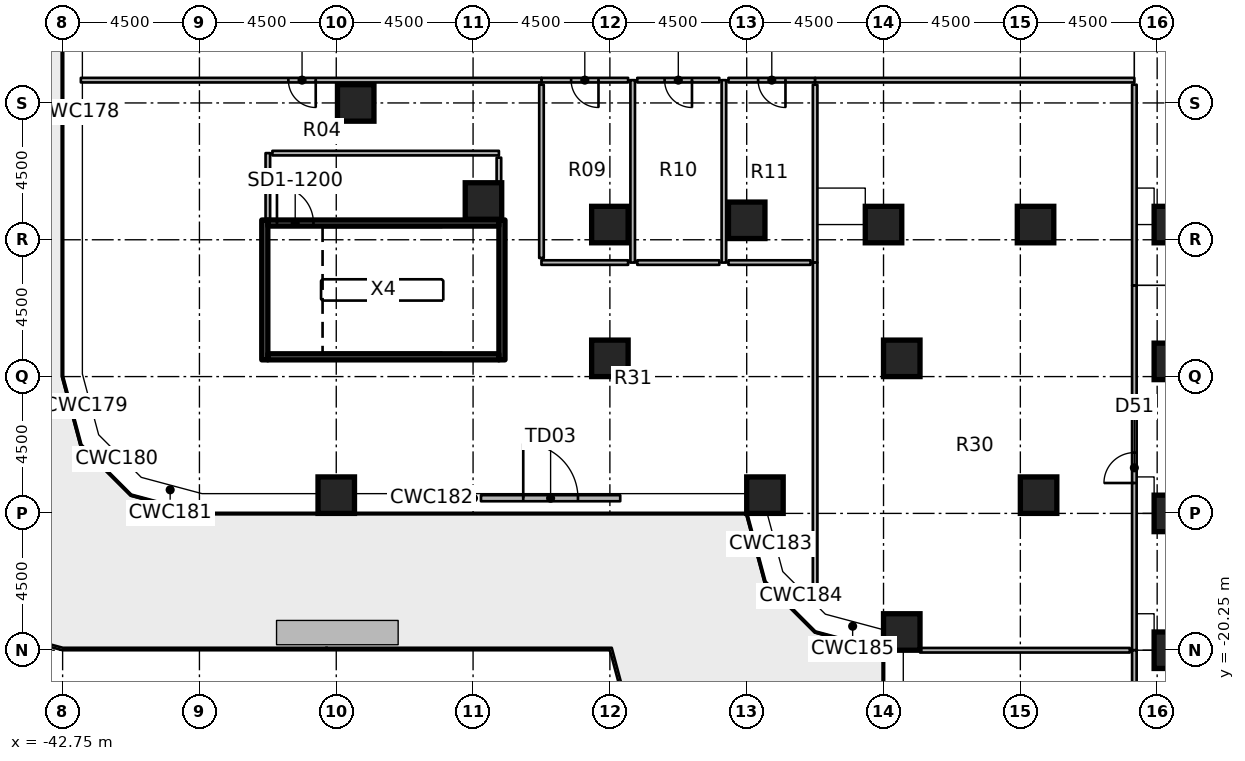
"""IFC4 building model, lengths in metres.
Left out: names, types, materials, properties, quantities, classifications, styles, units other than length and angle.
Written with IfcOpenShell. Run it as: python <this file> out.ifc"""

import sys

from ifc_helpers import new_model, si_unit, direction, frame, frame_2d, origin, origin_2d, place, context, subcontext, project, spatial, rectangle, extrude, element, fill, save


model = new_model("IFC4")
c1 = context("Model", 3, precision=1e-05, world=origin(), true_north=direction((0.0, 1.0)))
c2 = subcontext(c1, "Body", "Model", "MODEL_VIEW")
j1 = project(units=[si_unit("LENGTHUNIT", "METRE"), si_unit("PLANEANGLEUNIT", "RADIAN")], contexts=[c1])
p1 = place(None, origin())
s1 = spatial("IfcSite", under=j1, at=p1, CompositionType="ELEMENT")
p2 = place(p1, origin())
s2 = spatial("IfcBuilding", under=s1, at=p2, CompositionType="ELEMENT")
p3 = place(p2, frame((0.0, 0.0, 17.0)))
s3 = spatial("IfcBuildingStorey", under=s2, at=p3, CompositionType="ELEMENT", Elevation=17.0)
for number, where, z_axis, x_axis in (
    (1, (-33.75, -15.15, 0.0), (0.0, 0.0, 1.0), (1.0, 0.0, 0.0)),
    (2, (-33.11, -2.25, 0.0), (0.0, 0.0, 1.0), (1.0, 0.0, 0.0)),
    (3, (-28.908, -5.475, 0.0), (0.0, 0.0, 1.0), (1.0, 0.0, 0.0)),
    (4, (-24.75, -10.65, 0.0), (0.0, 0.0, 1.0), (1.0, 0.0, 0.0)),
    (5, (-24.75, -6.25, 0.0), (0.0, 0.0, 1.0), (1.0, 0.0, 0.0)),
    (6, (-19.65, -15.15, 0.0), (0.0, 0.0, 1.0), (1.0, 0.0, 0.0)),
    (7, (-20.25, -6.11, 0.0), (0.0, 0.0, 1.0), (1.0, 0.0, 0.0)),
    (8, (-15.15, -19.65, 0.0), (0.0, 0.0, 1.0), (1.0, 0.0, 0.0)),
    (9, (-15.15, -10.65, 0.0), (0.0, 0.0, 1.0), (1.0, 0.0, 0.0)),
    (10, (-15.75, -6.25, 0.0), (0.0, 0.0, 1.0), (1.0, 0.0, 0.0)),
    (11, (-10.65, -15.15, 0.0), (0.0, 0.0, 1.0), (1.0, 0.0, 0.0)),
    (12, (-10.75, -6.25, 0.0), (0.0, 0.0, 1.0), (1.0, 0.0, 0.0)),
    (13, (-6.25, -20.25, 0.0), (0.0, 0.0, 1.0), (1.0, 0.0, 0.0)),
    (14, (-6.25, -15.75, 0.0), (0.0, 0.0, 1.0), (1.0, 0.0, 0.0)),
    (15, (-6.25, -10.75, 0.0), (0.0, 0.0, 1.0), (1.0, 0.0, 0.0)),
    (16, (-6.25, -6.25, 0.0), (0.0, 0.0, 1.0), (1.0, 0.0, 0.0)),
):
    element("IfcColumn", number, at=place(p3, frame(where, z_axis=z_axis, x_axis=x_axis)), inside=s3, PredefinedType="COLUMN", context=c2, shape_type="SweptSolid", body=[
        extrude(rectangle(XDim=1.2, YDim=1.2, at=origin_2d()), origin(), (0.0, 0.0, 1.0), 4.55),
    ])
p4 = place(p3, frame((-28.99, -15.25, 0.0), z_axis=(0.0, 0.0, 1.0), x_axis=(1.0, 0.0, 0.0)))
e17 = element("IfcWall", 17, at=p4, inside=s3, PredefinedType="SOLIDWALL", context=c2, shape_type="SweptSolid", body=[
    extrude(rectangle(XDim=4.58, YDim=0.2, at=frame_2d((2.29, 0.0))), origin(), (0.0, 0.0, 1.0), 4.55),
])
p5 = place(p4, frame((1.39, 0.0, 0.0)))
e18 = element("IfcOpeningElement", 18, at=p5, cuts=e17, PredefinedType="OPENING", context=c2, shape_type="SweptSolid", body=[
    extrude(rectangle(XDim=1.8, YDim=2.4, at=frame_2d((0.9, 1.2))), frame((0.0, 0.11, 0.0), z_axis=(0.0, -1.0, 0.0), x_axis=(1.0, 0.0, 0.0)), (0.0, 0.0, 1.0), 0.22),
])
for number, where, z_axis, x_axis in (
    (19, (-36.1, -10.7, 0.0), (0.0, 0.0, 1.0), (0.0, 1.0, 0.0)),
    (20, (-28.3, -10.7, 0.0), (0.0, 0.0, 1.0), (0.0, 1.0, 0.0)),
):
    element("IfcWall", number, at=place(p3, frame(where, z_axis=z_axis, x_axis=x_axis)), inside=s3, PredefinedType="SHEAR", context=c2, shape_type="SweptSolid", body=[
        extrude(rectangle(XDim=4.6, YDim=0.2, at=frame_2d((2.3, 0.0))), origin(), (0.0, 0.0, 1.0), 4.55),
    ])
p6 = place(p3, frame((-36.0, -10.6, 0.0), z_axis=(0.0, 0.0, 1.0), x_axis=(1.0, 0.0, 0.0)))
e21 = element("IfcWall", 21, at=p6, inside=s3, PredefinedType="SHEAR", context=c2, shape_type="SweptSolid", body=[
    extrude(rectangle(XDim=7.6, YDim=0.2, at=frame_2d((3.8, 0.0))), origin(), (0.0, 0.0, 1.0), 4.55),
])
p7 = place(p3, frame((-36.0, -6.2, 0.0), z_axis=(0.0, 0.0, 1.0), x_axis=(1.0, 0.0, 0.0)))
e22 = element("IfcWall", 22, at=p7, inside=s3, PredefinedType="SHEAR", context=c2, shape_type="SweptSolid", body=[
    extrude(rectangle(XDim=7.6, YDim=0.2, at=frame_2d((3.8, 0.0))), origin(), (0.0, 0.0, 1.0), 4.55),
])
p8 = place(p7, frame((0.3, 0.0, 0.0)))
e23 = element("IfcOpeningElement", 23, at=p8, cuts=e22, PredefinedType="OPENING", context=c2, shape_type="SweptSolid", body=[
    extrude(rectangle(XDim=1.2, YDim=2.1, at=frame_2d((0.6, 1.05))), frame((0.0, 0.11, 0.0), z_axis=(0.0, -1.0, 0.0), x_axis=(1.0, 0.0, 0.0)), (0.0, 0.0, 1.0), 0.22),
])
p9 = place(p3, frame((-36.0, -6.1, 0.0), z_axis=(0.0, 0.0, 1.0), x_axis=(0.0, 1.0, 0.0)))
e24 = element("IfcWall", 24, at=p9, inside=s3, PredefinedType="PARTITIONING", context=c2, shape_type="SweptSolid", body=[
    extrude(rectangle(XDim=2.2, YDim=0.15, at=frame_2d((1.1, 0.0))), origin(), (0.0, 0.0, 1.0), 4.55),
])
p10 = place(p3, frame((-35.85, -3.9, 0.0), z_axis=(0.0, 0.0, 1.0), x_axis=(1.0, 0.0, 0.0)))
e25 = element("IfcWall", 25, at=p10, inside=s3, PredefinedType="PARTITIONING", context=c2, shape_type="SweptSolid", body=[
    extrude(rectangle(XDim=7.45, YDim=0.15, at=frame_2d((3.725, 0.0))), origin(), (0.0, 0.0, 1.0), 4.55),
])
p11 = place(p3, frame((-28.4, -4.05, 0.0), z_axis=(0.0, 0.0, 1.0), x_axis=(0.0, -1.0, 0.0)))
e26 = element("IfcWall", 26, at=p11, inside=s3, PredefinedType="PARTITIONING", context=c2, shape_type="SweptSolid", body=[
    extrude(rectangle(XDim=0.825, YDim=0.15, at=frame_2d((0.413, 0.0))), origin(), (0.0, 0.0, 1.0), 4.55),
])
p12 = place(p3, frame((-24.0, -1.5, 0.0), z_axis=(0.0, 0.0, 1.0), x_axis=(0.0, -1.0, 0.0)))
e27 = element("IfcWall", 27, at=p12, inside=s3, PredefinedType="PARTITIONING", context=c2, shape_type="SweptSolid", body=[
    extrude(rectangle(XDim=6.0, YDim=0.15, at=frame_2d((3.0, 0.0))), origin(), (0.0, 0.0, 1.0), 4.55),
])
p13 = place(p3, frame((-24.15, -1.5, 0.0), z_axis=(0.0, 0.0, 1.0), x_axis=(-1.0, 0.0, 0.0)))
e28 = element("IfcWall", 28, at=p13, inside=s3, PredefinedType="PARTITIONING", context=c2, shape_type="SweptSolid", body=[
    extrude(rectangle(XDim=2.85, YDim=0.15, at=frame_2d((1.425, 0.0))), origin(), (0.0, 0.0, 1.0), 4.55),
])
p14 = place(p13, frame((0.975, 0.0, 0.0)))
e29 = element("IfcOpeningElement", 29, at=p14, cuts=e28, PredefinedType="OPENING", context=c2, shape_type="SweptSolid", body=[
    extrude(rectangle(XDim=0.9, YDim=2.1, at=frame_2d((0.45, 1.05))), frame((0.0, 0.085, 0.0), z_axis=(0.0, -1.0, 0.0), x_axis=(1.0, 0.0, 0.0)), (0.0, 0.0, 1.0), 0.17),
])
p15 = place(p3, frame((-24.15, -7.5, 0.0), z_axis=(0.0, 0.0, 1.0), x_axis=(-1.0, 0.0, 0.0)))
e30 = element("IfcWall", 30, at=p15, inside=s3, PredefinedType="PARTITIONING", context=c2, shape_type="SweptSolid", body=[
    extrude(rectangle(XDim=2.85, YDim=0.15, at=frame_2d((1.425, 0.0))), origin(), (0.0, 0.0, 1.0), 4.55),
])
p16 = place(p3, frame((-27.0, -7.35, 0.0), z_axis=(0.0, 0.0, 1.0), x_axis=(0.0, 1.0, 0.0)))
e31 = element("IfcWall", 31, at=p16, inside=s3, PredefinedType="PARTITIONING", context=c2, shape_type="SweptSolid", body=[
    extrude(rectangle(XDim=5.7, YDim=0.15, at=frame_2d((2.85, 0.0))), origin(), (0.0, 0.0, 1.0), 4.55),
])
p17 = place(p3, frame((-21.0, -1.5, 0.0), z_axis=(0.0, 0.0, 1.0), x_axis=(0.0, -1.0, 0.0)))
e32 = element("IfcWall", 32, at=p17, inside=s3, PredefinedType="PARTITIONING", context=c2, shape_type="SweptSolid", body=[
    extrude(rectangle(XDim=6.0, YDim=0.15, at=frame_2d((3.0, 0.0))), origin(), (0.0, 0.0, 1.0), 4.55),
])
p18 = place(p3, frame((-21.15, -1.5, 0.0), z_axis=(0.0, 0.0, 1.0), x_axis=(-1.0, 0.0, 0.0)))
e33 = element("IfcWall", 33, at=p18, inside=s3, PredefinedType="PARTITIONING", context=c2, shape_type="SweptSolid", body=[
    extrude(rectangle(XDim=2.7, YDim=0.15, at=frame_2d((1.35, 0.0))), origin(), (0.0, 0.0, 1.0), 4.55),
])
p19 = place(p18, frame((0.9, 0.0, 0.0)))
e34 = element("IfcOpeningElement", 34, at=p19, cuts=e33, PredefinedType="OPENING", context=c2, shape_type="SweptSolid", body=[
    extrude(rectangle(XDim=0.9, YDim=2.1, at=frame_2d((0.45, 1.05))), frame((0.0, 0.085, 0.0), z_axis=(0.0, -1.0, 0.0), x_axis=(1.0, 0.0, 0.0)), (0.0, 0.0, 1.0), 0.17),
])
p20 = place(p3, frame((-21.15, -7.5, 0.0), z_axis=(0.0, 0.0, 1.0), x_axis=(-1.0, 0.0, 0.0)))
e35 = element("IfcWall", 35, at=p20, inside=s3, PredefinedType="PARTITIONING", context=c2, shape_type="SweptSolid", body=[
    extrude(rectangle(XDim=2.7, YDim=0.15, at=frame_2d((1.35, 0.0))), origin(), (0.0, 0.0, 1.0), 4.55),
])
p21 = place(p3, frame((-18.0, -1.5, 0.0), z_axis=(0.0, 0.0, 1.0), x_axis=(-1.0, 0.0, 0.0)))
e36 = element("IfcWall", 36, at=p21, inside=s3, PredefinedType="PARTITIONING", context=c2, shape_type="SweptSolid", body=[
    extrude(rectangle(XDim=2.85, YDim=0.15, at=frame_2d((1.425, 0.0))), origin(), (0.0, 0.0, 1.0), 4.55),
])
p22 = place(p21, frame((0.975, 0.0, 0.0)))
e37 = element("IfcOpeningElement", 37, at=p22, cuts=e36, PredefinedType="OPENING", context=c2, shape_type="SweptSolid", body=[
    extrude(rectangle(XDim=0.9, YDim=2.1, at=frame_2d((0.45, 1.05))), frame((0.0, 0.085, 0.0), z_axis=(0.0, -1.0, 0.0), x_axis=(1.0, 0.0, 0.0)), (0.0, 0.0, 1.0), 0.17),
])
p23 = place(p3, frame((-18.0, -1.65, 0.0), z_axis=(0.0, 0.0, 1.0), x_axis=(0.0, -1.0, 0.0)))
e38 = element("IfcWall", 38, at=p23, inside=s3, PredefinedType="PARTITIONING", context=c2, shape_type="SweptSolid", body=[
    extrude(rectangle(XDim=5.85, YDim=0.15, at=frame_2d((2.925, 0.0))), origin(), (0.0, 0.0, 1.0), 4.55),
])
p24 = place(p3, frame((-18.15, -7.5, 0.0), z_axis=(0.0, 0.0, 1.0), x_axis=(-1.0, 0.0, 0.0)))
e39 = element("IfcWall", 39, at=p24, inside=s3, PredefinedType="PARTITIONING", context=c2, shape_type="SweptSolid", body=[
    extrude(rectangle(XDim=2.7, YDim=0.15, at=frame_2d((1.35, 0.0))), origin(), (0.0, 0.0, 1.0), 4.55),
])
p25 = place(p3, frame((-7.5, -20.25, 0.0), z_axis=(0.0, 0.0, 1.0), x_axis=(0.0, 1.0, 0.0)))
e40 = element("IfcWall", 40, at=p25, inside=s3, PredefinedType="PARTITIONING", context=c2, shape_type="SweptSolid", body=[
    extrude(rectangle(XDim=12.0, YDim=0.15, at=frame_2d((6.0, 0.0))), origin(), (0.0, 0.0, 1.0), 4.55),
])
p26 = place(p25, frame((5.5, 0.0, 0.0)))
e41 = element("IfcOpeningElement", 41, at=p26, cuts=e40, PredefinedType="OPENING", context=c2, shape_type="SweptSolid", body=[
    extrude(rectangle(XDim=1.0, YDim=2.1, at=frame_2d((0.5, 1.05))), frame((0.0, 0.085, 0.0), z_axis=(0.0, -1.0, 0.0), x_axis=(1.0, 0.0, 0.0)), (0.0, 0.0, 1.0), 0.17),
])
p27 = place(p3, frame((-7.5, -32.25, 0.0), z_axis=(0.0, 0.0, 1.0), x_axis=(0.0, 1.0, 0.0)))
e42 = element("IfcWall", 42, at=p27, inside=s3, PredefinedType="PARTITIONING", context=c2, shape_type="SweptSolid", body=[
    extrude(rectangle(XDim=12.0, YDim=0.15, at=frame_2d((6.0, 0.0))), origin(), (0.0, 0.0, 1.0), 4.55),
])
p28 = place(p27, frame((6.0, 0.0, 0.0)))
e43 = element("IfcOpeningElement", 43, at=p28, cuts=e42, PredefinedType="OPENING", context=c2, shape_type="SweptSolid", body=[
    extrude(rectangle(XDim=0.9, YDim=2.1, at=frame_2d((0.45, 1.05))), frame((0.0, 0.085, 0.0), z_axis=(0.0, -1.0, 0.0), x_axis=(1.0, 0.0, 0.0)), (0.0, 0.0, 1.0), 0.17),
])
p29 = place(p3, frame((-7.5, -1.5, 0.0), z_axis=(0.0, 0.0, 1.0), x_axis=(-1.0, 0.0, 0.0)))
e44 = element("IfcWall", 44, at=p29, inside=s3, PredefinedType="PARTITIONING", context=c2, shape_type="SweptSolid", body=[
    extrude(rectangle(XDim=10.5, YDim=0.15, at=frame_2d((5.25, 0.0))), origin(), (0.0, 0.0, 1.0), 4.55),
])
p30 = place(p3, frame((-27.0, -1.5, 0.0), z_axis=(0.0, 0.0, 1.0), x_axis=(-1.0, 0.0, 0.0)))
e45 = element("IfcWall", 45, at=p30, inside=s3, PredefinedType="PARTITIONING", context=c2, shape_type="SweptSolid", body=[
    extrude(rectangle(XDim=15.15, YDim=0.15, at=frame_2d((7.575, 0.0))), origin(), (0.0, 0.0, 1.0), 4.55),
])
p31 = place(p30, frame((7.425, 0.0, 0.0)))
e46 = element("IfcOpeningElement", 46, at=p31, cuts=e45, PredefinedType="OPENING", context=c2, shape_type="SweptSolid", body=[
    extrude(rectangle(XDim=0.9, YDim=2.1, at=frame_2d((0.45, 1.05))), frame((0.0, 0.085, 0.0), z_axis=(0.0, -1.0, 0.0), x_axis=(1.0, 0.0, 0.0)), (0.0, 0.0, 1.0), 0.17),
])
p32 = place(p3, frame((-18.0, -18.797, 0.0), z_axis=(0.0, 0.0, 1.0), x_axis=(0.0, 1.0, 0.0)))
e47 = element("IfcWall", 47, at=p32, inside=s3, PredefinedType="PARTITIONING", context=c2, shape_type="SweptSolid", body=[
    extrude(rectangle(XDim=11.297, YDim=0.15, at=frame_2d((5.648, 0.0))), origin(), (0.0, 0.0, 1.0), 4.55),
])
p33 = place(p3, frame((-7.65, -20.25, 0.0), z_axis=(0.0, 0.0, 1.0), x_axis=(-1.0, 0.0, 0.0)))
e48 = element("IfcWall", 48, at=p33, inside=s3, PredefinedType="PARTITIONING", context=c2, shape_type="SweptSolid", body=[
    extrude(rectangle(XDim=6.9, YDim=0.15, at=frame_2d((3.45, 0.0))), origin(), (0.0, 0.0, 1.0), 4.55),
])
p34 = place(p3, frame((-7.5, -1.65, 0.0), z_axis=(0.0, 0.0, 1.0), x_axis=(0.0, -1.0, 0.0)))
e49 = element("IfcWall", 49, at=p34, inside=s3, PredefinedType="PARTITIONING", context=c2, shape_type="SweptSolid", body=[
    extrude(rectangle(XDim=6.6, YDim=0.15, at=frame_2d((3.3, 0.0))), origin(), (0.0, 0.0, 1.0), 4.55),
])
p35 = place(p5, origin())
e50 = element("IfcDoor", 50, at=p35, inside=s3, OperationType="SINGLE_SWING_LEFT", PredefinedType="DOOR", context=c2, shape_type="SweptSolid", body=[
    extrude(rectangle(XDim=1.8, YDim=2.4, at=frame_2d((0.9, 1.2))), frame((0.0, 0.025, 0.0), z_axis=(0.0, -1.0, 0.0), x_axis=(1.0, 0.0, 0.0)), (0.0, 0.0, 1.0), 0.05),
])
fill(e18, e50)
p36 = place(p8, origin())
e51 = element("IfcDoor", 51, at=p36, inside=s3, OperationType="SINGLE_SWING_RIGHT", PredefinedType="DOOR", context=c2, shape_type="SweptSolid", body=[
    extrude(rectangle(XDim=1.2, YDim=2.1, at=frame_2d((0.6, 1.05))), frame((0.0, 0.025, 0.0), z_axis=(0.0, -1.0, 0.0), x_axis=(1.0, 0.0, 0.0)), (0.0, 0.0, 1.0), 0.05),
])
fill(e23, e51)
p37 = place(p14, origin())
e52 = element("IfcDoor", 52, at=p37, inside=s3, OperationType="SINGLE_SWING_LEFT", PredefinedType="DOOR", context=c2, shape_type="SweptSolid", body=[
    extrude(rectangle(XDim=0.9, YDim=2.1, at=frame_2d((0.45, 1.05))), frame((0.0, 0.025, 0.0), z_axis=(0.0, -1.0, 0.0), x_axis=(1.0, 0.0, 0.0)), (0.0, 0.0, 1.0), 0.05),
])
fill(e29, e52)
p38 = place(p19, origin())
e53 = element("IfcDoor", 53, at=p38, inside=s3, OperationType="SINGLE_SWING_LEFT", PredefinedType="DOOR", context=c2, shape_type="SweptSolid", body=[
    extrude(rectangle(XDim=0.9, YDim=2.1, at=frame_2d((0.45, 1.05))), frame((0.0, 0.025, 0.0), z_axis=(0.0, -1.0, 0.0), x_axis=(1.0, 0.0, 0.0)), (0.0, 0.0, 1.0), 0.05),
])
fill(e34, e53)
p39 = place(p22, origin())
e54 = element("IfcDoor", 54, at=p39, inside=s3, OperationType="SINGLE_SWING_LEFT", PredefinedType="DOOR", context=c2, shape_type="SweptSolid", body=[
    extrude(rectangle(XDim=0.9, YDim=2.1, at=frame_2d((0.45, 1.05))), frame((0.0, 0.025, 0.0), z_axis=(0.0, -1.0, 0.0), x_axis=(1.0, 0.0, 0.0)), (0.0, 0.0, 1.0), 0.05),
])
fill(e37, e54)
p40 = place(p26, origin())
e55 = element("IfcDoor", 55, at=p40, inside=s3, OperationType="SINGLE_SWING_LEFT", PredefinedType="DOOR", context=c2, shape_type="SweptSolid", body=[
    extrude(rectangle(XDim=1.0, YDim=2.1, at=frame_2d((0.5, 1.05))), frame((0.0, 0.025, 0.0), z_axis=(0.0, -1.0, 0.0), x_axis=(1.0, 0.0, 0.0)), (0.0, 0.0, 1.0), 0.05),
])
fill(e41, e55)
p41 = place(p31, origin())
e56 = element("IfcDoor", 56, at=p41, inside=s3, OperationType="SINGLE_SWING_LEFT", PredefinedType="DOOR", context=c2, shape_type="SweptSolid", body=[
    extrude(rectangle(XDim=0.9, YDim=2.1, at=frame_2d((0.45, 1.05))), frame((0.0, 0.025, 0.0), z_axis=(0.0, -1.0, 0.0), x_axis=(1.0, 0.0, 0.0)), (0.0, 0.0, 1.0), 0.05),
])
fill(e46, e56)
save(model, sys.argv[1])
